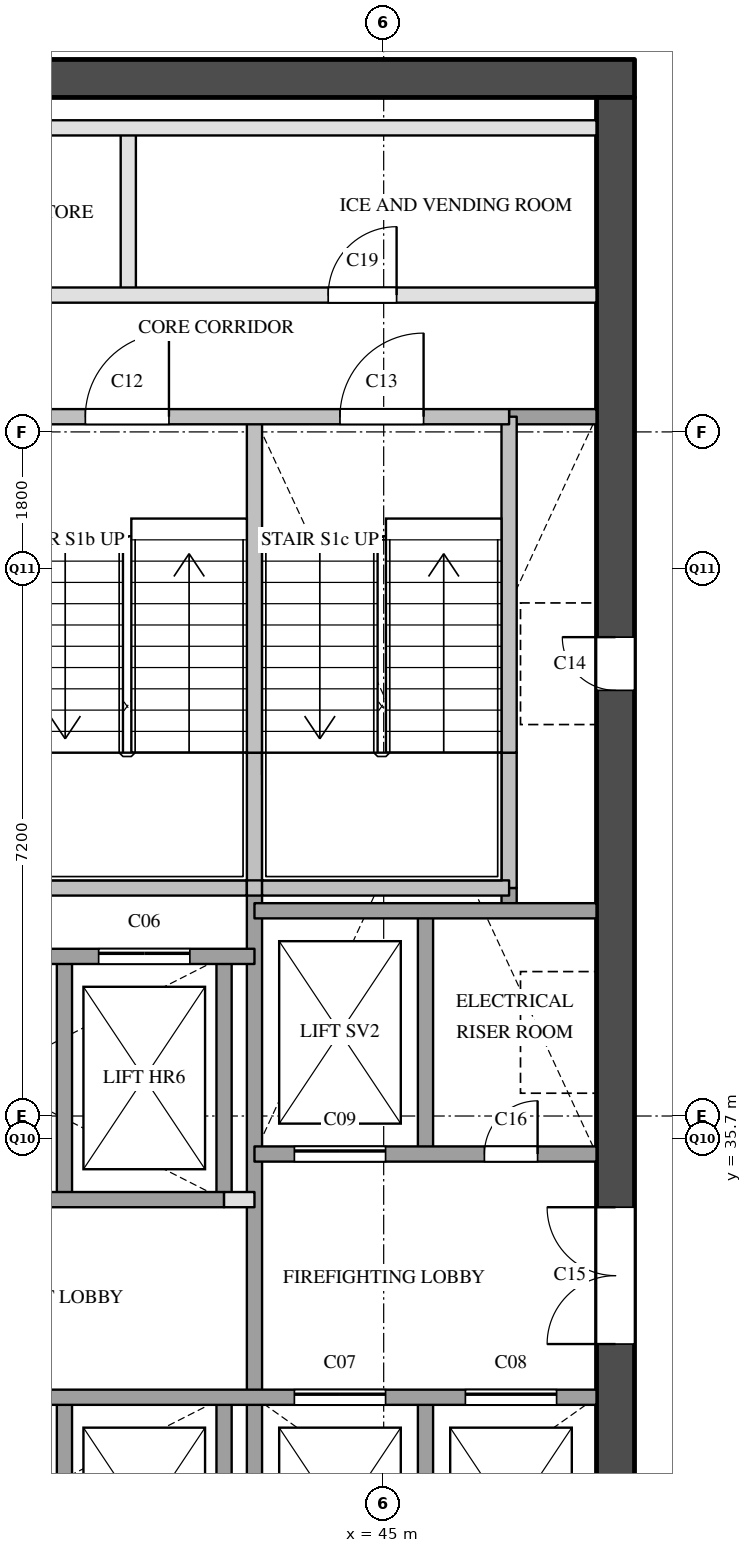
"""IFC4 building model, lengths in metres.
Left out: names, types, materials, properties, quantities, classifications, styles, units other than length and angle.
Written with IfcOpenShell. Run it as: python <this file> out.ifc"""

import sys

from ifc_helpers import new_model, si_unit, direction, frame, frame_2d, origin, place, context, subcontext, project, spatial, rectangle, extrude, element, fill, save


model = new_model("IFC4")
c1 = context("Model", 3, precision=1e-05, world=origin(), true_north=direction((0.0, 1.0)))
c2 = subcontext(c1, "Body", "Model", "MODEL_VIEW")
j1 = project(units=[si_unit("LENGTHUNIT", "METRE"), si_unit("PLANEANGLEUNIT", "RADIAN")], contexts=[c1])
p1 = place(None, origin())
s1 = spatial("IfcSite", under=j1, at=p1, CompositionType="ELEMENT")
p2 = place(p1, origin())
s2 = spatial("IfcBuilding", under=s1, at=p2, CompositionType="ELEMENT")
p3 = place(p2, frame((0.0, 0.0, 142.7)))
s3 = spatial("IfcBuildingStorey", under=s2, at=p3, CompositionType="ELEMENT", Elevation=142.7)
p4 = place(p3, frame((36.1, 49.65, 0.0), z_axis=(0.0, 0.0, 1.0), x_axis=(1.0, 0.0, 0.0)))
e1 = element("IfcWall", 1, at=p4, inside=s3, PredefinedType="SHEAR", context=c2, shape_type="SweptSolid", body=[
    extrude(rectangle(XDim=12.2, YDim=0.5, at=frame_2d((6.1, 0.0))), origin(), (0.0, 0.0, 1.0), 3.6),
])
p5 = place(p3, frame((48.05, 29.1, 0.0), z_axis=(0.0, 0.0, 1.0), x_axis=(0.0, 1.0, 0.0)))
e2 = element("IfcWall", 2, at=p5, inside=s3, PredefinedType="SHEAR", context=c2, shape_type="SweptSolid", body=[
    extrude(rectangle(XDim=20.3, YDim=0.5, at=frame_2d((10.15, 0.0))), origin(), (0.0, 0.0, 1.0), 3.6),
])
p6 = place(p5, frame((12.5, 0.0, 0.0)))
e3 = element("IfcOpeningElement", 3, at=p6, cuts=e2, PredefinedType="OPENING", context=c2, shape_type="SweptSolid", body=[
    extrude(rectangle(XDim=0.7, YDim=2.1, at=frame_2d((0.35, 1.05))), frame((0.0, 0.26, 0.0), z_axis=(0.0, -1.0, 0.0), x_axis=(1.0, 0.0, 0.0)), (0.0, 0.0, 1.0), 0.52),
])
p7 = place(p5, frame((3.9, 0.0, 0.0)))
e4 = element("IfcOpeningElement", 4, at=p7, cuts=e2, PredefinedType="OPENING", context=c2, shape_type="SweptSolid", body=[
    extrude(rectangle(XDim=1.8, YDim=2.1, at=frame_2d((0.9, 1.05))), frame((0.0, 0.26, 0.0), z_axis=(0.0, -1.0, 0.0), x_axis=(1.0, 0.0, 0.0)), (0.0, 0.0, 1.0), 0.52),
])
p8 = place(p3, frame((40.8, 29.1, 0.0), z_axis=(0.0, 0.0, 1.0), x_axis=(0.0, 1.0, 0.0)))
e5 = element("IfcWall", 5, at=p8, inside=s3, PredefinedType="SOLIDWALL", context=c2, shape_type="SweptSolid", body=[
    extrude(rectangle(XDim=3.2, YDim=0.2, at=frame_2d((1.6, 0.0))), origin(), (0.0, 0.0, 1.0), 3.6),
])
p9 = place(p3, frame((40.8, 34.9, 0.0), z_axis=(0.0, 0.0, 1.0), x_axis=(0.0, 1.0, 0.0)))
e6 = element("IfcWall", 6, at=p9, inside=s3, PredefinedType="SOLIDWALL", context=c2, shape_type="SweptSolid", body=[
    extrude(rectangle(XDim=3.2, YDim=0.2, at=frame_2d((1.6, 0.0))), origin(), (0.0, 0.0, 1.0), 3.6),
])
p10 = place(p3, frame((41.64, 46.8, 0.0), z_axis=(0.0, 0.0, 1.0), x_axis=(0.0, 1.0, 0.0)))
e7 = element("IfcWall", 7, at=p10, inside=s3, PredefinedType="PARTITIONING", context=c2, shape_type="SweptSolid", body=[
    extrude(rectangle(XDim=2.2, YDim=0.2, at=frame_2d((1.1, 0.0))), origin(), (0.0, 0.0, 1.0), 3.6),
])
p11 = place(p3, frame((42.9, 29.1, 0.0), z_axis=(0.0, 0.0, 1.0), x_axis=(0.0, 1.0, 0.0)))
e8 = element("IfcWall", 8, at=p11, inside=s3, PredefinedType="SOLIDWALL", context=c2, shape_type="SweptSolid", body=[
    extrude(rectangle(XDim=3.2, YDim=0.2, at=frame_2d((1.6, 0.0))), origin(), (0.0, 0.0, 1.0), 3.6),
])
p12 = place(p3, frame((42.9, 34.9, 0.0), z_axis=(0.0, 0.0, 1.0), x_axis=(0.0, 1.0, 0.0)))
e9 = element("IfcWall", 9, at=p12, inside=s3, PredefinedType="SOLIDWALL", context=c2, shape_type="SweptSolid", body=[
    extrude(rectangle(XDim=3.2, YDim=0.2, at=frame_2d((1.6, 0.0))), origin(), (0.0, 0.0, 1.0), 3.6),
])
p13 = place(p3, frame((43.3, 29.1, 0.0), z_axis=(0.0, 0.0, 1.0), x_axis=(0.0, 1.0, 0.0)))
e10 = element("IfcWall", 10, at=p13, inside=s3, PredefinedType="SOLIDWALL", context=c2, shape_type="SweptSolid", body=[
    extrude(rectangle(XDim=9.9, YDim=0.2, at=frame_2d((4.95, 0.0))), origin(), (0.0, 0.0, 1.0), 3.6),
])
p14 = place(p3, frame((43.3, 39.0, 0.0), z_axis=(0.0, 0.0, 1.0), x_axis=(0.0, 1.0, 0.0)))
e11 = element("IfcWall", 11, at=p14, inside=s3, PredefinedType="SOLIDWALL", context=c2, shape_type="SweptSolid", body=[
    extrude(rectangle(XDim=1.78, YDim=0.2, at=frame_2d((0.89, 0.0))), origin(), (0.0, 0.0, 1.0), 3.6),
])
p15 = place(p3, frame((43.3, 40.78, 0.0), z_axis=(0.0, 0.0, 1.0), x_axis=(0.0, 1.0, 0.0)))
e12 = element("IfcWall", 12, at=p15, inside=s3, PredefinedType="SOLIDWALL", context=c2, shape_type="SweptSolid", body=[
    extrude(rectangle(XDim=4.42, YDim=0.2, at=frame_2d((2.21, 0.0))), origin(), (0.0, 0.0, 1.0), 3.6),
])
for number, where, z_axis, x_axis in (
    (13, (45.55, 29.1, 0.0), (0.0, 0.0, 1.0), (0.0, 1.0, 0.0)),
    (14, (45.55, 35.5, 0.0), (0.0, 0.0, 1.0), (0.0, 1.0, 0.0)),
):
    element("IfcWall", number, at=place(p3, frame(where, z_axis=z_axis, x_axis=x_axis)), inside=s3, PredefinedType="SOLIDWALL", context=c2, shape_type="SweptSolid", body=[
        extrude(rectangle(XDim=3.2, YDim=0.2, at=frame_2d((1.6, 0.0))), origin(), (0.0, 0.0, 1.0), 3.6),
    ])
p16 = place(p3, frame((46.65, 38.7, 0.0), z_axis=(0.0, 0.0, 1.0), x_axis=(0.0, 1.0, 0.0)))
e15 = element("IfcWall", 15, at=p16, inside=s3, PredefinedType="SOLIDWALL", context=c2, shape_type="SweptSolid", body=[
    extrude(rectangle(XDim=0.3, YDim=0.2, at=frame_2d((0.15, 0.0))), origin(), (0.0, 0.0, 1.0), 3.6),
])
p17 = place(p3, frame((46.65, 39.0, 0.0), z_axis=(0.0, 0.0, 1.0), x_axis=(0.0, 1.0, 0.0)))
e16 = element("IfcWall", 16, at=p17, inside=s3, PredefinedType="SOLIDWALL", context=c2, shape_type="SweptSolid", body=[
    extrude(rectangle(XDim=1.78, YDim=0.2, at=frame_2d((0.89, 0.0))), origin(), (0.0, 0.0, 1.0), 3.6),
])
p18 = place(p3, frame((46.65, 40.78, 0.0), z_axis=(0.0, 0.0, 1.0), x_axis=(0.0, 1.0, 0.0)))
e17 = element("IfcWall", 17, at=p18, inside=s3, PredefinedType="SOLIDWALL", context=c2, shape_type="SweptSolid", body=[
    extrude(rectangle(XDim=4.42, YDim=0.2, at=frame_2d((2.21, 0.0))), origin(), (0.0, 0.0, 1.0), 3.6),
])
p19 = place(p3, frame((36.6, 32.3, 0.0), z_axis=(0.0, 0.0, 1.0), x_axis=(1.0, 0.0, 0.0)))
e18 = element("IfcWall", 18, at=p19, inside=s3, PredefinedType="SOLIDWALL", context=c2, shape_type="SweptSolid", body=[
    extrude(rectangle(XDim=11.2, YDim=0.2, at=frame_2d((5.6, 0.0))), origin(), (0.0, 0.0, 1.0), 3.6),
])
p20 = place(p19, frame((7.225, 0.0, 0.0)))
e19 = element("IfcOpeningElement", 19, at=p20, cuts=e18, PredefinedType="OPENING", context=c2, shape_type="SweptSolid", body=[
    extrude(rectangle(XDim=1.2, YDim=2.1, at=frame_2d((0.6, 1.05))), frame((0.0, 0.11, 0.0), z_axis=(0.0, -1.0, 0.0), x_axis=(1.0, 0.0, 0.0)), (0.0, 0.0, 1.0), 0.22),
])
p21 = place(p19, frame((9.475, 0.0, 0.0)))
e20 = element("IfcOpeningElement", 20, at=p21, cuts=e18, PredefinedType="OPENING", context=c2, shape_type="SweptSolid", body=[
    extrude(rectangle(XDim=1.2, YDim=2.1, at=frame_2d((0.6, 1.05))), frame((0.0, 0.11, 0.0), z_axis=(0.0, -1.0, 0.0), x_axis=(1.0, 0.0, 0.0)), (0.0, 0.0, 1.0), 0.22),
])
p22 = place(p3, frame((42.9, 34.9, 0.0), z_axis=(0.0, 0.0, 1.0), x_axis=(1.0, 0.0, 0.0)))
e21 = element("IfcWall", 21, at=p22, inside=s3, PredefinedType="PARTITIONING", context=c2, shape_type="SweptSolid", body=[
    extrude(rectangle(XDim=0.4, YDim=0.2, at=frame_2d((0.2, 0.0))), origin(), (0.0, 0.0, 1.0), 3.6),
])
p23 = place(p3, frame((36.6, 34.9, 0.0), z_axis=(0.0, 0.0, 1.0), x_axis=(1.0, 0.0, 0.0)))
e22 = element("IfcWall", 22, at=p23, inside=s3, PredefinedType="SOLIDWALL", context=c2, shape_type="SweptSolid", body=[
    extrude(rectangle(XDim=6.3, YDim=0.2, at=frame_2d((3.15, 0.0))), origin(), (0.0, 0.0, 1.0), 3.6),
])
p24 = place(p3, frame((43.3, 35.5, 0.0), z_axis=(0.0, 0.0, 1.0), x_axis=(1.0, 0.0, 0.0)))
e23 = element("IfcWall", 23, at=p24, inside=s3, PredefinedType="SOLIDWALL", context=c2, shape_type="SweptSolid", body=[
    extrude(rectangle(XDim=4.5, YDim=0.2, at=frame_2d((2.25, 0.0))), origin(), (0.0, 0.0, 1.0), 3.6),
])
p25 = place(p24, frame((0.525, 0.0, 0.0)))
e24 = element("IfcOpeningElement", 24, at=p25, cuts=e23, PredefinedType="OPENING", context=c2, shape_type="SweptSolid", body=[
    extrude(rectangle(XDim=1.2, YDim=2.1, at=frame_2d((0.6, 1.05))), frame((0.0, 0.11, 0.0), z_axis=(0.0, -1.0, 0.0), x_axis=(1.0, 0.0, 0.0)), (0.0, 0.0, 1.0), 0.22),
])
p26 = place(p24, frame((3.025, 0.0, 0.0)))
e25 = element("IfcOpeningElement", 25, at=p26, cuts=e23, PredefinedType="OPENING", context=c2, shape_type="SweptSolid", body=[
    extrude(rectangle(XDim=0.7, YDim=2.1, at=frame_2d((0.35, 1.05))), frame((0.0, 0.11, 0.0), z_axis=(0.0, -1.0, 0.0), x_axis=(1.0, 0.0, 0.0)), (0.0, 0.0, 1.0), 0.22),
])
p27 = place(p3, frame((36.6, 38.1, 0.0), z_axis=(0.0, 0.0, 1.0), x_axis=(1.0, 0.0, 0.0)))
e26 = element("IfcWall", 26, at=p27, inside=s3, PredefinedType="SOLIDWALL", context=c2, shape_type="SweptSolid", body=[
    extrude(rectangle(XDim=6.7, YDim=0.2, at=frame_2d((3.35, 0.0))), origin(), (0.0, 0.0, 1.0), 3.6),
])
p28 = place(p27, frame((0.45, 0.0, 0.0)))
e27 = element("IfcOpeningElement", 27, at=p28, cuts=e26, PredefinedType="OPENING", context=c2, shape_type="SweptSolid", body=[
    extrude(rectangle(XDim=1.2, YDim=2.1, at=frame_2d((0.6, 1.05))), frame((0.0, 0.11, 0.0), z_axis=(0.0, -1.0, 0.0), x_axis=(1.0, 0.0, 0.0)), (0.0, 0.0, 1.0), 0.22),
])
p29 = place(p27, frame((2.55, 0.0, 0.0)))
e28 = element("IfcOpeningElement", 28, at=p29, cuts=e26, PredefinedType="OPENING", context=c2, shape_type="SweptSolid", body=[
    extrude(rectangle(XDim=1.2, YDim=2.1, at=frame_2d((0.6, 1.05))), frame((0.0, 0.11, 0.0), z_axis=(0.0, -1.0, 0.0), x_axis=(1.0, 0.0, 0.0)), (0.0, 0.0, 1.0), 0.22),
])
p30 = place(p27, frame((4.65, 0.0, 0.0)))
e29 = element("IfcOpeningElement", 29, at=p30, cuts=e26, PredefinedType="OPENING", context=c2, shape_type="SweptSolid", body=[
    extrude(rectangle(XDim=1.2, YDim=2.1, at=frame_2d((0.6, 1.05))), frame((0.0, 0.11, 0.0), z_axis=(0.0, -1.0, 0.0), x_axis=(1.0, 0.0, 0.0)), (0.0, 0.0, 1.0), 0.22),
])
p31 = place(p3, frame((43.3, 38.7, 0.0), z_axis=(0.0, 0.0, 1.0), x_axis=(1.0, 0.0, 0.0)))
e30 = element("IfcWall", 30, at=p31, inside=s3, PredefinedType="SOLIDWALL", context=c2, shape_type="SweptSolid", body=[
    extrude(rectangle(XDim=4.5, YDim=0.2, at=frame_2d((2.25, 0.0))), origin(), (0.0, 0.0, 1.0), 3.6),
])
p32 = place(p3, frame((40.05, 39.0, 0.0), z_axis=(0.0, 0.0, 1.0), x_axis=(1.0, 0.0, 0.0)))
e31 = element("IfcWall", 31, at=p32, inside=s3, PredefinedType="SOLIDWALL", context=c2, shape_type="SweptSolid", body=[
    extrude(rectangle(XDim=3.15, YDim=0.2, at=frame_2d((1.575, 0.0))), origin(), (0.0, 0.0, 1.0), 3.6),
])
p33 = place(p3, frame((43.2, 39.0, 0.0), z_axis=(0.0, 0.0, 1.0), x_axis=(1.0, 0.0, 0.0)))
e32 = element("IfcWall", 32, at=p33, inside=s3, PredefinedType="SOLIDWALL", context=c2, shape_type="SweptSolid", body=[
    extrude(rectangle(XDim=0.2, YDim=0.2, at=frame_2d((0.1, 0.0))), origin(), (0.0, 0.0, 1.0), 3.6),
])
p34 = place(p3, frame((43.4, 39.0, 0.0), z_axis=(0.0, 0.0, 1.0), x_axis=(1.0, 0.0, 0.0)))
e33 = element("IfcWall", 33, at=p34, inside=s3, PredefinedType="SOLIDWALL", context=c2, shape_type="SweptSolid", body=[
    extrude(rectangle(XDim=3.25, YDim=0.2, at=frame_2d((1.625, 0.0))), origin(), (0.0, 0.0, 1.0), 3.6),
])
p35 = place(p3, frame((46.65, 45.2, 0.0), z_axis=(0.0, 0.0, 1.0), x_axis=(1.0, 0.0, 0.0)))
e34 = element("IfcWall", 34, at=p35, inside=s3, PredefinedType="SOLIDWALL", context=c2, shape_type="SweptSolid", body=[
    extrude(rectangle(XDim=1.15, YDim=0.2, at=frame_2d((0.575, 0.0))), origin(), (0.0, 0.0, 1.0), 3.6),
])
p36 = place(p3, frame((36.6, 45.2, 0.0), z_axis=(0.0, 0.0, 1.0), x_axis=(1.0, 0.0, 0.0)))
e35 = element("IfcWall", 35, at=p36, inside=s3, PredefinedType="SOLIDWALL", context=c2, shape_type="SweptSolid", body=[
    extrude(rectangle(XDim=10.05, YDim=0.2, at=frame_2d((5.025, 0.0))), origin(), (0.0, 0.0, 1.0), 3.6),
])
p37 = place(p36, frame((1.125, 0.0, 0.0)))
e36 = element("IfcOpeningElement", 36, at=p37, cuts=e35, PredefinedType="OPENING", context=c2, shape_type="SweptSolid", body=[
    extrude(rectangle(XDim=1.1, YDim=2.1, at=frame_2d((0.55, 1.05))), frame((0.0, 0.11, 0.0), z_axis=(0.0, -1.0, 0.0), x_axis=(1.0, 0.0, 0.0)), (0.0, 0.0, 1.0), 0.22),
])
p38 = place(p36, frame((4.475, 0.0, 0.0)))
e37 = element("IfcOpeningElement", 37, at=p38, cuts=e35, PredefinedType="OPENING", context=c2, shape_type="SweptSolid", body=[
    extrude(rectangle(XDim=1.1, YDim=2.1, at=frame_2d((0.55, 1.05))), frame((0.0, 0.11, 0.0), z_axis=(0.0, -1.0, 0.0), x_axis=(1.0, 0.0, 0.0)), (0.0, 0.0, 1.0), 0.22),
])
p39 = place(p36, frame((7.825, 0.0, 0.0)))
e38 = element("IfcOpeningElement", 38, at=p39, cuts=e35, PredefinedType="OPENING", context=c2, shape_type="SweptSolid", body=[
    extrude(rectangle(XDim=1.1, YDim=2.1, at=frame_2d((0.55, 1.05))), frame((0.0, 0.11, 0.0), z_axis=(0.0, -1.0, 0.0), x_axis=(1.0, 0.0, 0.0)), (0.0, 0.0, 1.0), 0.22),
])
p40 = place(p3, frame((36.6, 46.8, 0.0), z_axis=(0.0, 0.0, 1.0), x_axis=(1.0, 0.0, 0.0)))
e39 = element("IfcWall", 39, at=p40, inside=s3, PredefinedType="PARTITIONING", context=c2, shape_type="SweptSolid", body=[
    extrude(rectangle(XDim=11.2, YDim=0.2, at=frame_2d((5.6, 0.0))), origin(), (0.0, 0.0, 1.0), 3.6),
])
p41 = place(p40, frame((2.07, 0.0, 0.0)))
e40 = element("IfcOpeningElement", 40, at=p41, cuts=e39, PredefinedType="OPENING", context=c2, shape_type="SweptSolid", body=[
    extrude(rectangle(XDim=0.9, YDim=2.1, at=frame_2d((0.45, 1.05))), frame((0.0, 0.11, 0.0), z_axis=(0.0, -1.0, 0.0), x_axis=(1.0, 0.0, 0.0)), (0.0, 0.0, 1.0), 0.22),
])
p42 = place(p40, frame((7.67, 0.0, 0.0)))
e41 = element("IfcOpeningElement", 41, at=p42, cuts=e39, PredefinedType="OPENING", context=c2, shape_type="SweptSolid", body=[
    extrude(rectangle(XDim=0.9, YDim=2.1, at=frame_2d((0.45, 1.05))), frame((0.0, 0.11, 0.0), z_axis=(0.0, -1.0, 0.0), x_axis=(1.0, 0.0, 0.0)), (0.0, 0.0, 1.0), 0.22),
])
p43 = place(p3, frame((36.6, 49.0, 0.0), z_axis=(0.0, 0.0, 1.0), x_axis=(1.0, 0.0, 0.0)))
e42 = element("IfcWall", 42, at=p43, inside=s3, PredefinedType="PARTITIONING", context=c2, shape_type="SweptSolid", body=[
    extrude(rectangle(XDim=11.2, YDim=0.2, at=frame_2d((5.6, 0.0))), origin(), (0.0, 0.0, 1.0), 3.6),
])
p44 = place(p30, origin())
e43 = element("IfcDoor", 43, at=p44, inside=s3, OperationType="SLIDING_TO_LEFT", PredefinedType="DOOR", context=c2, shape_type="SweptSolid", body=[
    extrude(rectangle(XDim=1.2, YDim=2.1, at=frame_2d((0.6, 1.05))), frame((0.0, 0.025, 0.0), z_axis=(0.0, -1.0, 0.0), x_axis=(1.0, 0.0, 0.0)), (0.0, 0.0, 1.0), 0.05),
])
fill(e29, e43)
p45 = place(p20, origin())
e44 = element("IfcDoor", 44, at=p45, inside=s3, OperationType="SLIDING_TO_LEFT", PredefinedType="DOOR", context=c2, shape_type="SweptSolid", body=[
    extrude(rectangle(XDim=1.2, YDim=2.1, at=frame_2d((0.6, 1.05))), frame((0.0, 0.025, 0.0), z_axis=(0.0, -1.0, 0.0), x_axis=(1.0, 0.0, 0.0)), (0.0, 0.0, 1.0), 0.05),
])
fill(e19, e44)
p46 = place(p21, origin())
e45 = element("IfcDoor", 45, at=p46, inside=s3, OperationType="SLIDING_TO_LEFT", PredefinedType="DOOR", context=c2, shape_type="SweptSolid", body=[
    extrude(rectangle(XDim=1.2, YDim=2.1, at=frame_2d((0.6, 1.05))), frame((0.0, 0.025, 0.0), z_axis=(0.0, -1.0, 0.0), x_axis=(1.0, 0.0, 0.0)), (0.0, 0.0, 1.0), 0.05),
])
fill(e20, e45)
p47 = place(p25, origin())
e46 = element("IfcDoor", 46, at=p47, inside=s3, OperationType="SLIDING_TO_LEFT", PredefinedType="DOOR", context=c2, shape_type="SweptSolid", body=[
    extrude(rectangle(XDim=1.2, YDim=2.1, at=frame_2d((0.6, 1.05))), frame((0.0, 0.025, 0.0), z_axis=(0.0, -1.0, 0.0), x_axis=(1.0, 0.0, 0.0)), (0.0, 0.0, 1.0), 0.05),
])
fill(e24, e46)
p48 = place(p38, origin())
e47 = element("IfcDoor", 47, at=p48, inside=s3, OperationType="SINGLE_SWING_RIGHT", PredefinedType="DOOR", context=c2, shape_type="SweptSolid", body=[
    extrude(rectangle(XDim=1.1, YDim=2.1, at=frame_2d((0.55, 1.05))), frame((0.0, 0.025, 0.0), z_axis=(0.0, -1.0, 0.0), x_axis=(1.0, 0.0, 0.0)), (0.0, 0.0, 1.0), 0.05),
])
fill(e37, e47)
p49 = place(p39, origin())
e48 = element("IfcDoor", 48, at=p49, inside=s3, OperationType="SINGLE_SWING_RIGHT", PredefinedType="DOOR", context=c2, shape_type="SweptSolid", body=[
    extrude(rectangle(XDim=1.1, YDim=2.1, at=frame_2d((0.55, 1.05))), frame((0.0, 0.025, 0.0), z_axis=(0.0, -1.0, 0.0), x_axis=(1.0, 0.0, 0.0)), (0.0, 0.0, 1.0), 0.05),
])
fill(e38, e48)
p50 = place(p6, origin())
e49 = element("IfcDoor", 49, at=p50, inside=s3, OperationType="SINGLE_SWING_RIGHT", PredefinedType="DOOR", context=c2, shape_type="SweptSolid", body=[
    extrude(rectangle(XDim=0.7, YDim=2.1, at=frame_2d((0.35, 1.05))), frame((0.0, 0.025, 0.0), z_axis=(0.0, -1.0, 0.0), x_axis=(1.0, 0.0, 0.0)), (0.0, 0.0, 1.0), 0.05),
])
fill(e3, e49)
p51 = place(p7, origin())
e50 = element("IfcDoor", 50, at=p51, inside=s3, OperationType="DOUBLE_DOOR_SINGLE_SWING", PredefinedType="DOOR", context=c2, shape_type="SweptSolid", body=[
    extrude(rectangle(XDim=1.8, YDim=2.1, at=frame_2d((0.9, 1.05))), frame((0.0, 0.025, 0.0), z_axis=(0.0, -1.0, 0.0), x_axis=(1.0, 0.0, 0.0)), (0.0, 0.0, 1.0), 0.05),
])
fill(e4, e50)
p52 = place(p26, origin())
e51 = element("IfcDoor", 51, at=p52, inside=s3, OperationType="SINGLE_SWING_RIGHT", PredefinedType="DOOR", context=c2, shape_type="SweptSolid", body=[
    extrude(rectangle(XDim=0.7, YDim=2.1, at=frame_2d((0.35, 1.05))), frame((0.0, 0.025, 0.0), z_axis=(0.0, -1.0, 0.0), x_axis=(1.0, 0.0, 0.0)), (0.0, 0.0, 1.0), 0.05),
])
fill(e25, e51)
p53 = place(p42, origin())
e52 = element("IfcDoor", 52, at=p53, inside=s3, OperationType="SINGLE_SWING_RIGHT", PredefinedType="DOOR", context=c2, shape_type="SweptSolid", body=[
    extrude(rectangle(XDim=0.9, YDim=2.1, at=frame_2d((0.45, 1.05))), frame((0.0, 0.025, 0.0), z_axis=(0.0, -1.0, 0.0), x_axis=(1.0, 0.0, 0.0)), (0.0, 0.0, 1.0), 0.05),
])
fill(e41, e52)
save(model, sys.argv[1])
